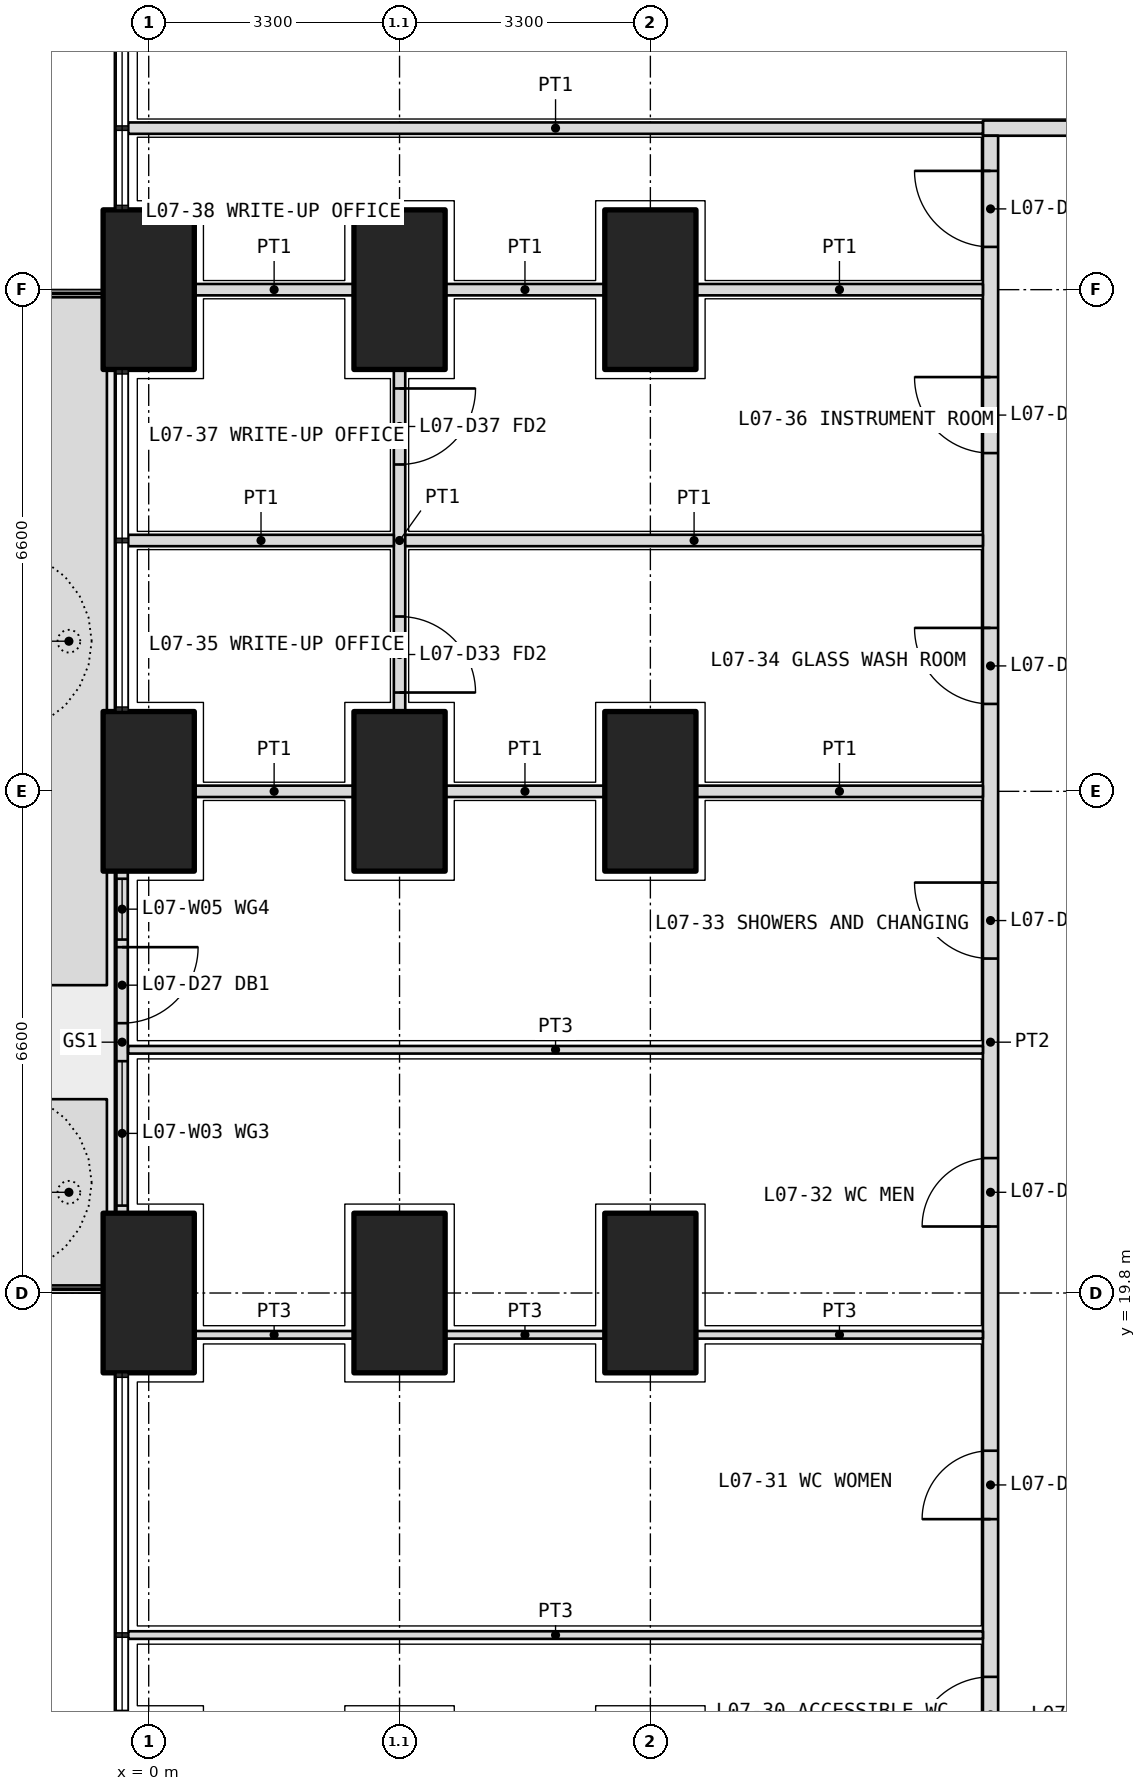
"""IFC4 building model, lengths in metres.
Left out: names, types, materials, properties, quantities, classifications, styles, units other than length and angle.
Written with IfcOpenShell. Run it as: python <this file> out.ifc"""

import sys

from ifc_helpers import new_model, si_unit, direction, frame, frame_2d, origin, origin_2d, place, context, subcontext, project, spatial, polyline, rectangle, outline, extrude, element, fill, save


model = new_model("IFC4")
c1 = context("Model", 3, precision=1e-05, world=origin(), true_north=direction((0.0, 1.0)))
c2 = subcontext(c1, "Body", "Model", "MODEL_VIEW")
j1 = project(units=[si_unit("LENGTHUNIT", "METRE"), si_unit("PLANEANGLEUNIT", "RADIAN")], contexts=[c1])
p1 = place(None, origin())
s1 = spatial("IfcSite", under=j1, at=p1, CompositionType="ELEMENT")
p2 = place(p1, origin())
s2 = spatial("IfcBuilding", under=s1, at=p2, CompositionType="ELEMENT")
p3 = place(p2, frame((0.0, 0.0, 33.9)))
s3 = spatial("IfcBuildingStorey", under=s2, at=p3, CompositionType="ELEMENT", Elevation=33.9)
for number, where, z_axis, x_axis in (
    (1, (0.0, 19.8, 0.0), (0.0, 0.0, 1.0), (0.0, 1.0, 0.0)),
    (2, (0.0, 26.4, 0.0), (0.0, 0.0, 1.0), (0.0, 1.0, 0.0)),
    (3, (0.0, 33.0, 0.0), (0.0, 0.0, 1.0), (0.0, 1.0, 0.0)),
    (4, (3.3, 19.8, 0.0), (0.0, 0.0, 1.0), (0.0, 1.0, 0.0)),
    (5, (3.3, 26.4, 0.0), (0.0, 0.0, 1.0), (0.0, 1.0, 0.0)),
    (6, (3.3, 33.0, 0.0), (0.0, 0.0, 1.0), (0.0, 1.0, 0.0)),
    (7, (6.6, 19.8, 0.0), (0.0, 0.0, 1.0), (0.0, 1.0, 0.0)),
    (8, (6.6, 26.4, 0.0), (0.0, 0.0, 1.0), (0.0, 1.0, 0.0)),
    (9, (6.6, 33.0, 0.0), (0.0, 0.0, 1.0), (0.0, 1.0, 0.0)),
):
    element("IfcColumn", number, at=place(p3, frame(where, z_axis=z_axis, x_axis=x_axis)), inside=s3, PredefinedType="COLUMN", context=c2, shape_type="SweptSolid", body=[
        extrude(rectangle(XDim=2.1, YDim=1.2, at=origin_2d()), origin(), (0.0, 0.0, 1.0), 4.2),
    ])
p4 = place(p3, origin())
e10 = element("IfcWall", 10, at=p4, inside=s3, PredefinedType="USERDEFINED", context=c2, shape_type="SweptSolid", body=[
    extrude(outline(polyline([(-1.55, 19.9), (-0.55, 19.9), (-0.55, 22.35), (-1.55, 22.35), (-1.55, 19.9)]), holes=[polyline([(-1.4, 20.05), (-0.7, 20.05), (-0.7, 22.2), (-1.4, 22.2), (-1.4, 20.05)])]), origin(), (0.0, 0.0, 1.0), 1.05),
])
p5 = place(p3, origin())
e11 = element("IfcWall", 11, at=p5, inside=s3, PredefinedType="USERDEFINED", context=c2, shape_type="SweptSolid", body=[
    extrude(outline(polyline([(-1.55, 23.85), (-0.55, 23.85), (-0.55, 32.9), (-1.55, 32.9), (-1.55, 23.85)]), holes=[polyline([(-1.4, 24.0), (-0.7, 24.0), (-0.7, 32.75), (-1.4, 32.75), (-1.4, 24.0)])]), origin(), (0.0, 0.0, 1.0), 1.05),
])
p6 = place(p3, frame((-0.35, 25.35, 0.0), z_axis=(0.0, 0.0, 1.0), x_axis=(0.0, -1.0, 0.0)))
e12 = element("IfcWall", 12, at=p6, inside=s3, PredefinedType="SOLIDWALL", context=c2, shape_type="SweptSolid", body=[
    extrude(rectangle(XDim=4.5, YDim=0.15, at=frame_2d((2.25, 0.0))), origin(), (0.0, 0.0, 1.0), 2.7),
])
p7 = place(p6, frame((1.0, 0.0, 0.0)))
e13 = element("IfcOpeningElement", 13, at=p7, cuts=e12, PredefinedType="OPENING", context=c2, shape_type="SweptSolid", body=[
    extrude(rectangle(XDim=1.0, YDim=2.4, at=frame_2d((0.5, 1.2))), frame((0.0, 0.085, 0.0), z_axis=(0.0, -1.0, 0.0), x_axis=(1.0, 0.0, 0.0)), (0.0, 0.0, 1.0), 0.17),
])
p8 = place(p6, frame((0.1, 0.0, 0.1)))
e14 = element("IfcOpeningElement", 14, at=p8, cuts=e12, PredefinedType="OPENING", context=c2, shape_type="SweptSolid", body=[
    extrude(rectangle(XDim=0.8, YDim=2.3, at=frame_2d((0.4, 1.15))), frame((0.0, 0.085, 0.0), z_axis=(0.0, -1.0, 0.0), x_axis=(1.0, 0.0, 0.0)), (0.0, 0.0, 1.0), 0.17),
])
p9 = place(p6, frame((2.5, 0.0, 0.1)))
e15 = element("IfcOpeningElement", 15, at=p9, cuts=e12, PredefinedType="OPENING", context=c2, shape_type="SweptSolid", body=[
    extrude(rectangle(XDim=1.9, YDim=2.3, at=frame_2d((0.95, 1.15))), frame((0.0, 0.085, 0.0), z_axis=(0.0, -1.0, 0.0), x_axis=(1.0, 0.0, 0.0)), (0.0, 0.0, 1.0), 0.17),
])
p10 = place(p3, frame((10.975, 35.125, 0.0), z_axis=(0.0, 0.0, 1.0), x_axis=(1.0, 0.0, 0.0)))
e16 = element("IfcWall", 16, at=p10, inside=s3, PredefinedType="PARTITIONING", context=c2, shape_type="SweptSolid", body=[
    extrude(rectangle(XDim=18.725, YDim=0.2, at=frame_2d((9.362, 0.0))), origin(), (0.0, 0.0, 1.0), 2.85),
])
p11 = place(p10, frame((5.512, 0.0, 0.0)))
e17 = element("IfcOpeningElement", 17, at=p11, cuts=e16, PredefinedType="OPENING", context=c2, shape_type="SweptSolid", body=[
    extrude(rectangle(XDim=1.2, YDim=2.1, at=frame_2d((0.6, 1.05))), frame((0.0, 0.11, 0.0), z_axis=(0.0, -1.0, 0.0), x_axis=(1.0, 0.0, 0.0)), (0.0, 0.0, 1.0), 0.22),
])
p12 = place(p10, frame((14.925, 0.0, 0.0)))
e18 = element("IfcOpeningElement", 18, at=p12, cuts=e16, PredefinedType="OPENING", context=c2, shape_type="SweptSolid", body=[
    extrude(rectangle(XDim=1.0, YDim=2.1, at=frame_2d((0.5, 1.05))), frame((0.0, 0.11, 0.0), z_axis=(0.0, -1.0, 0.0), x_axis=(1.0, 0.0, 0.0)), (0.0, 0.0, 1.0), 0.22),
])
p13 = place(p3, frame((11.075, 11.175, 0.0), z_axis=(0.0, 0.0, 1.0), x_axis=(0.0, 1.0, 0.0)))
e19 = element("IfcWall", 19, at=p13, inside=s3, PredefinedType="PARTITIONING", context=c2, shape_type="SweptSolid", body=[
    extrude(rectangle(XDim=23.85, YDim=0.2, at=frame_2d((11.925, 0.0))), origin(), (0.0, 0.0, 1.0), 2.85),
])
p14 = place(p13, frame((0.363, 0.0, 0.0)))
e20 = element("IfcOpeningElement", 20, at=p14, cuts=e19, PredefinedType="OPENING", context=c2, shape_type="SweptSolid", body=[
    extrude(rectangle(XDim=1.2, YDim=2.1, at=frame_2d((0.6, 1.05))), frame((0.0, 0.11, 0.0), z_axis=(0.0, -1.0, 0.0), x_axis=(1.0, 0.0, 0.0)), (0.0, 0.0, 1.0), 0.22),
])
p15 = place(p13, frame((2.575, 0.0, 0.0)))
e21 = element("IfcOpeningElement", 21, at=p15, cuts=e19, PredefinedType="OPENING", context=c2, shape_type="SweptSolid", body=[
    extrude(rectangle(XDim=1.0, YDim=2.1, at=frame_2d((0.5, 1.05))), frame((0.0, 0.11, 0.0), z_axis=(0.0, -1.0, 0.0), x_axis=(1.0, 0.0, 0.0)), (0.0, 0.0, 1.0), 0.22),
])
p16 = place(p13, frame((5.65, 0.0, 0.0)))
e22 = element("IfcOpeningElement", 22, at=p16, cuts=e19, PredefinedType="OPENING", context=c2, shape_type="SweptSolid", body=[
    extrude(rectangle(XDim=0.9, YDim=2.1, at=frame_2d((0.45, 1.05))), frame((0.0, 0.11, 0.0), z_axis=(0.0, -1.0, 0.0), x_axis=(1.0, 0.0, 0.0)), (0.0, 0.0, 1.0), 0.22),
])
p17 = place(p13, frame((9.5, 0.0, 0.0)))
e23 = element("IfcOpeningElement", 23, at=p17, cuts=e19, PredefinedType="OPENING", context=c2, shape_type="SweptSolid", body=[
    extrude(rectangle(XDim=0.9, YDim=2.1, at=frame_2d((0.45, 1.05))), frame((0.0, 0.11, 0.0), z_axis=(0.0, -1.0, 0.0), x_axis=(1.0, 0.0, 0.0)), (0.0, 0.0, 1.0), 0.22),
])
p18 = place(p13, frame((13.025, 0.0, 0.0)))
e24 = element("IfcOpeningElement", 24, at=p18, cuts=e19, PredefinedType="OPENING", context=c2, shape_type="SweptSolid", body=[
    extrude(rectangle(XDim=1.0, YDim=2.1, at=frame_2d((0.5, 1.05))), frame((0.0, 0.11, 0.0), z_axis=(0.0, -1.0, 0.0), x_axis=(1.0, 0.0, 0.0)), (0.0, 0.0, 1.0), 0.22),
])
p19 = place(p13, frame((16.375, 0.0, 0.0)))
e25 = element("IfcOpeningElement", 25, at=p19, cuts=e19, PredefinedType="OPENING", context=c2, shape_type="SweptSolid", body=[
    extrude(rectangle(XDim=1.0, YDim=2.1, at=frame_2d((0.5, 1.05))), frame((0.0, 0.11, 0.0), z_axis=(0.0, -1.0, 0.0), x_axis=(1.0, 0.0, 0.0)), (0.0, 0.0, 1.0), 0.22),
])
p20 = place(p13, frame((19.675, 0.0, 0.0)))
e26 = element("IfcOpeningElement", 26, at=p20, cuts=e19, PredefinedType="OPENING", context=c2, shape_type="SweptSolid", body=[
    extrude(rectangle(XDim=1.0, YDim=2.1, at=frame_2d((0.5, 1.05))), frame((0.0, 0.11, 0.0), z_axis=(0.0, -1.0, 0.0), x_axis=(1.0, 0.0, 0.0)), (0.0, 0.0, 1.0), 0.22),
])
p21 = place(p13, frame((22.387, 0.0, 0.0)))
e27 = element("IfcOpeningElement", 27, at=p21, cuts=e19, PredefinedType="OPENING", context=c2, shape_type="SweptSolid", body=[
    extrude(rectangle(XDim=1.0, YDim=2.1, at=frame_2d((0.5, 1.05))), frame((0.0, 0.11, 0.0), z_axis=(0.0, -1.0, 0.0), x_axis=(1.0, 0.0, 0.0)), (0.0, 0.0, 1.0), 0.22),
])
p22 = place(p3, frame((-0.27, 35.125, 0.0), z_axis=(0.0, 0.0, 1.0), x_axis=(1.0, 0.0, 0.0)))
e28 = element("IfcWall", 28, at=p22, inside=s3, PredefinedType="PARTITIONING", context=c2, shape_type="SweptSolid", body=[
    extrude(rectangle(XDim=11.245, YDim=0.15, at=frame_2d((5.623, 0.0))), origin(), (0.0, 0.0, 1.0), 2.7),
])
p23 = place(p3, frame((3.3, 31.95, 0.0), z_axis=(0.0, 0.0, 1.0), x_axis=(0.0, -1.0, 0.0)))
e29 = element("IfcWall", 29, at=p23, inside=s3, PredefinedType="PARTITIONING", context=c2, shape_type="SweptSolid", body=[
    extrude(rectangle(XDim=4.5, YDim=0.15, at=frame_2d((2.25, 0.0))), origin(), (0.0, 0.0, 1.0), 3.9),
])
p24 = place(p23, frame((3.25, 0.0, 0.0)))
e30 = element("IfcOpeningElement", 30, at=p24, cuts=e29, PredefinedType="OPENING", context=c2, shape_type="SweptSolid", body=[
    extrude(rectangle(XDim=1.0, YDim=2.1, at=frame_2d((0.5, 1.05))), frame((0.0, 0.085, 0.0), z_axis=(0.0, -1.0, 0.0), x_axis=(1.0, 0.0, 0.0)), (0.0, 0.0, 1.0), 0.17),
])
p25 = place(p23, frame((0.25, 0.0, 0.0)))
e31 = element("IfcOpeningElement", 31, at=p25, cuts=e29, PredefinedType="OPENING", context=c2, shape_type="SweptSolid", body=[
    extrude(rectangle(XDim=1.0, YDim=2.1, at=frame_2d((0.5, 1.05))), frame((0.0, 0.085, 0.0), z_axis=(0.0, -1.0, 0.0), x_axis=(1.0, 0.0, 0.0)), (0.0, 0.0, 1.0), 0.17),
])
p26 = place(p3, frame((-0.27, 15.3, 0.0), z_axis=(0.0, 0.0, 1.0), x_axis=(1.0, 0.0, 0.0)))
e32 = element("IfcWall", 32, at=p26, inside=s3, PredefinedType="PARTITIONING", context=c2, shape_type="SweptSolid", body=[
    extrude(rectangle(XDim=11.245, YDim=0.1, at=frame_2d((5.623, 0.0))), origin(), (0.0, 0.0, 1.0), 2.7),
])
p27 = place(p3, frame((0.6, 19.25, 0.0), z_axis=(0.0, 0.0, 1.0), x_axis=(1.0, 0.0, 0.0)))
e33 = element("IfcWall", 33, at=p27, inside=s3, PredefinedType="PARTITIONING", context=c2, shape_type="SweptSolid", body=[
    extrude(rectangle(XDim=2.1, YDim=0.1, at=frame_2d((1.05, 0.0))), origin(), (0.0, 0.0, 1.0), 2.85),
])
p28 = place(p3, frame((3.9, 19.25, 0.0), z_axis=(0.0, 0.0, 1.0), x_axis=(1.0, 0.0, 0.0)))
e34 = element("IfcWall", 34, at=p28, inside=s3, PredefinedType="PARTITIONING", context=c2, shape_type="SweptSolid", body=[
    extrude(rectangle(XDim=2.1, YDim=0.1, at=frame_2d((1.05, 0.0))), origin(), (0.0, 0.0, 1.0), 2.85),
])
p29 = place(p3, frame((7.2, 19.25, 0.0), z_axis=(0.0, 0.0, 1.0), x_axis=(1.0, 0.0, 0.0)))
e35 = element("IfcWall", 35, at=p29, inside=s3, PredefinedType="PARTITIONING", context=c2, shape_type="SweptSolid", body=[
    extrude(rectangle(XDim=3.775, YDim=0.1, at=frame_2d((1.888, 0.0))), origin(), (0.0, 0.0, 1.0), 2.85),
])
p30 = place(p3, frame((-0.27, 23.0, 0.0), z_axis=(0.0, 0.0, 1.0), x_axis=(1.0, 0.0, 0.0)))
e36 = element("IfcWall", 36, at=p30, inside=s3, PredefinedType="PARTITIONING", context=c2, shape_type="SweptSolid", body=[
    extrude(rectangle(XDim=11.245, YDim=0.1, at=frame_2d((5.623, 0.0))), origin(), (0.0, 0.0, 1.0), 2.7),
])
p31 = place(p3, frame((0.6, 26.4, 0.0), z_axis=(0.0, 0.0, 1.0), x_axis=(1.0, 0.0, 0.0)))
e37 = element("IfcWall", 37, at=p31, inside=s3, PredefinedType="PARTITIONING", context=c2, shape_type="SweptSolid", body=[
    extrude(rectangle(XDim=2.1, YDim=0.15, at=frame_2d((1.05, 0.0))), origin(), (0.0, 0.0, 1.0), 2.85),
])
p32 = place(p3, frame((3.9, 26.4, 0.0), z_axis=(0.0, 0.0, 1.0), x_axis=(1.0, 0.0, 0.0)))
e38 = element("IfcWall", 38, at=p32, inside=s3, PredefinedType="PARTITIONING", context=c2, shape_type="SweptSolid", body=[
    extrude(rectangle(XDim=2.1, YDim=0.15, at=frame_2d((1.05, 0.0))), origin(), (0.0, 0.0, 1.0), 2.85),
])
p33 = place(p3, frame((7.2, 26.4, 0.0), z_axis=(0.0, 0.0, 1.0), x_axis=(1.0, 0.0, 0.0)))
e39 = element("IfcWall", 39, at=p33, inside=s3, PredefinedType="PARTITIONING", context=c2, shape_type="SweptSolid", body=[
    extrude(rectangle(XDim=3.775, YDim=0.15, at=frame_2d((1.888, 0.0))), origin(), (0.0, 0.0, 1.0), 2.85),
])
p34 = place(p3, frame((-0.27, 29.7, 0.0), z_axis=(0.0, 0.0, 1.0), x_axis=(1.0, 0.0, 0.0)))
e40 = element("IfcWall", 40, at=p34, inside=s3, PredefinedType="PARTITIONING", context=c2, shape_type="SweptSolid", body=[
    extrude(rectangle(XDim=3.495, YDim=0.15, at=frame_2d((1.748, 0.0))), origin(), (0.0, 0.0, 1.0), 2.7),
])
p35 = place(p3, frame((3.375, 29.7, 0.0), z_axis=(0.0, 0.0, 1.0), x_axis=(1.0, 0.0, 0.0)))
e41 = element("IfcWall", 41, at=p35, inside=s3, PredefinedType="PARTITIONING", context=c2, shape_type="SweptSolid", body=[
    extrude(rectangle(XDim=7.6, YDim=0.15, at=frame_2d((3.8, 0.0))), origin(), (0.0, 0.0, 1.0), 3.9),
])
p36 = place(p3, frame((0.6, 33.0, 0.0), z_axis=(0.0, 0.0, 1.0), x_axis=(1.0, 0.0, 0.0)))
e42 = element("IfcWall", 42, at=p36, inside=s3, PredefinedType="PARTITIONING", context=c2, shape_type="SweptSolid", body=[
    extrude(rectangle(XDim=2.1, YDim=0.15, at=frame_2d((1.05, 0.0))), origin(), (0.0, 0.0, 1.0), 2.85),
])
p37 = place(p3, frame((3.9, 33.0, 0.0), z_axis=(0.0, 0.0, 1.0), x_axis=(1.0, 0.0, 0.0)))
e43 = element("IfcWall", 43, at=p37, inside=s3, PredefinedType="PARTITIONING", context=c2, shape_type="SweptSolid", body=[
    extrude(rectangle(XDim=2.1, YDim=0.15, at=frame_2d((1.05, 0.0))), origin(), (0.0, 0.0, 1.0), 2.85),
])
p38 = place(p3, frame((7.2, 33.0, 0.0), z_axis=(0.0, 0.0, 1.0), x_axis=(1.0, 0.0, 0.0)))
e44 = element("IfcWall", 44, at=p38, inside=s3, PredefinedType="PARTITIONING", context=c2, shape_type="SweptSolid", body=[
    extrude(rectangle(XDim=3.775, YDim=0.15, at=frame_2d((1.888, 0.0))), origin(), (0.0, 0.0, 1.0), 2.85),
])
p39 = place(p7, origin())
e45 = element("IfcDoor", 45, at=p39, inside=s3, OperationType="SINGLE_SWING_LEFT", PredefinedType="DOOR", context=c2, shape_type="SweptSolid", body=[
    extrude(rectangle(XDim=1.0, YDim=2.4, at=frame_2d((0.5, 1.2))), frame((0.0, 0.025, 0.0), z_axis=(0.0, -1.0, 0.0), x_axis=(1.0, 0.0, 0.0)), (0.0, 0.0, 1.0), 0.05),
])
fill(e13, e45)
p40 = place(p8, origin())
e46 = element("IfcWindow", 46, at=p40, inside=s3, PartitioningType="SINGLE_PANEL", PredefinedType="WINDOW", context=c2, shape_type="SweptSolid", body=[
    extrude(rectangle(XDim=0.8, YDim=2.3, at=frame_2d((0.4, 1.15))), frame((0.0, 0.03, 0.0), z_axis=(0.0, -1.0, 0.0), x_axis=(1.0, 0.0, 0.0)), (0.0, 0.0, 1.0), 0.06),
])
fill(e14, e46)
p41 = place(p9, origin())
e47 = element("IfcWindow", 47, at=p41, inside=s3, PartitioningType="SINGLE_PANEL", PredefinedType="WINDOW", context=c2, shape_type="SweptSolid", body=[
    extrude(rectangle(XDim=1.9, YDim=2.3, at=frame_2d((0.95, 1.15))), frame((0.0, 0.03, 0.0), z_axis=(0.0, -1.0, 0.0), x_axis=(1.0, 0.0, 0.0)), (0.0, 0.0, 1.0), 0.06),
])
fill(e15, e47)
p42 = place(p15, origin())
e48 = element("IfcDoor", 48, at=p42, inside=s3, OperationType="SINGLE_SWING_LEFT", PredefinedType="DOOR", context=c2, shape_type="SweptSolid", body=[
    extrude(rectangle(XDim=1.0, YDim=2.1, at=frame_2d((0.5, 1.05))), frame((0.0, 0.025, 0.0), z_axis=(0.0, -1.0, 0.0), x_axis=(1.0, 0.0, 0.0)), (0.0, 0.0, 1.0), 0.05),
])
fill(e21, e48)
p43 = place(p16, origin())
e49 = element("IfcDoor", 49, at=p43, inside=s3, OperationType="SINGLE_SWING_LEFT", PredefinedType="DOOR", context=c2, shape_type="SweptSolid", body=[
    extrude(rectangle(XDim=0.9, YDim=2.1, at=frame_2d((0.45, 1.05))), frame((0.0, 0.025, 0.0), z_axis=(0.0, -1.0, 0.0), x_axis=(1.0, 0.0, 0.0)), (0.0, 0.0, 1.0), 0.05),
])
fill(e22, e49)
p44 = place(p17, origin())
e50 = element("IfcDoor", 50, at=p44, inside=s3, OperationType="SINGLE_SWING_LEFT", PredefinedType="DOOR", context=c2, shape_type="SweptSolid", body=[
    extrude(rectangle(XDim=0.9, YDim=2.1, at=frame_2d((0.45, 1.05))), frame((0.0, 0.025, 0.0), z_axis=(0.0, -1.0, 0.0), x_axis=(1.0, 0.0, 0.0)), (0.0, 0.0, 1.0), 0.05),
])
fill(e23, e50)
p45 = place(p18, origin())
e51 = element("IfcDoor", 51, at=p45, inside=s3, OperationType="SINGLE_SWING_RIGHT", PredefinedType="DOOR", context=c2, shape_type="SweptSolid", body=[
    extrude(rectangle(XDim=1.0, YDim=2.1, at=frame_2d((0.5, 1.05))), frame((0.0, 0.025, 0.0), z_axis=(0.0, -1.0, 0.0), x_axis=(1.0, 0.0, 0.0)), (0.0, 0.0, 1.0), 0.05),
])
fill(e24, e51)
p46 = place(p19, origin())
e52 = element("IfcDoor", 52, at=p46, inside=s3, OperationType="SINGLE_SWING_RIGHT", PredefinedType="DOOR", context=c2, shape_type="SweptSolid", body=[
    extrude(rectangle(XDim=1.0, YDim=2.1, at=frame_2d((0.5, 1.05))), frame((0.0, 0.025, 0.0), z_axis=(0.0, -1.0, 0.0), x_axis=(1.0, 0.0, 0.0)), (0.0, 0.0, 1.0), 0.05),
])
fill(e25, e52)
p47 = place(p24, origin())
e53 = element("IfcDoor", 53, at=p47, inside=s3, OperationType="SINGLE_SWING_RIGHT", PredefinedType="DOOR", context=c2, shape_type="SweptSolid", body=[
    extrude(rectangle(XDim=1.0, YDim=2.1, at=frame_2d((0.5, 1.05))), frame((0.0, 0.025, 0.0), z_axis=(0.0, -1.0, 0.0), x_axis=(1.0, 0.0, 0.0)), (0.0, 0.0, 1.0), 0.05),
])
fill(e30, e53)
p48 = place(p20, origin())
e54 = element("IfcDoor", 54, at=p48, inside=s3, OperationType="SINGLE_SWING_RIGHT", PredefinedType="DOOR", context=c2, shape_type="SweptSolid", body=[
    extrude(rectangle(XDim=1.0, YDim=2.1, at=frame_2d((0.5, 1.05))), frame((0.0, 0.025, 0.0), z_axis=(0.0, -1.0, 0.0), x_axis=(1.0, 0.0, 0.0)), (0.0, 0.0, 1.0), 0.05),
])
fill(e26, e54)
p49 = place(p25, origin())
e55 = element("IfcDoor", 55, at=p49, inside=s3, OperationType="SINGLE_SWING_LEFT", PredefinedType="DOOR", context=c2, shape_type="SweptSolid", body=[
    extrude(rectangle(XDim=1.0, YDim=2.1, at=frame_2d((0.5, 1.05))), frame((0.0, 0.025, 0.0), z_axis=(0.0, -1.0, 0.0), x_axis=(1.0, 0.0, 0.0)), (0.0, 0.0, 1.0), 0.05),
])
fill(e31, e55)
p50 = place(p21, origin())
e56 = element("IfcDoor", 56, at=p50, inside=s3, OperationType="SINGLE_SWING_RIGHT", PredefinedType="DOOR", context=c2, shape_type="SweptSolid", body=[
    extrude(rectangle(XDim=1.0, YDim=2.1, at=frame_2d((0.5, 1.05))), frame((0.0, 0.025, 0.0), z_axis=(0.0, -1.0, 0.0), x_axis=(1.0, 0.0, 0.0)), (0.0, 0.0, 1.0), 0.05),
])
fill(e27, e56)
save(model, sys.argv[1])
